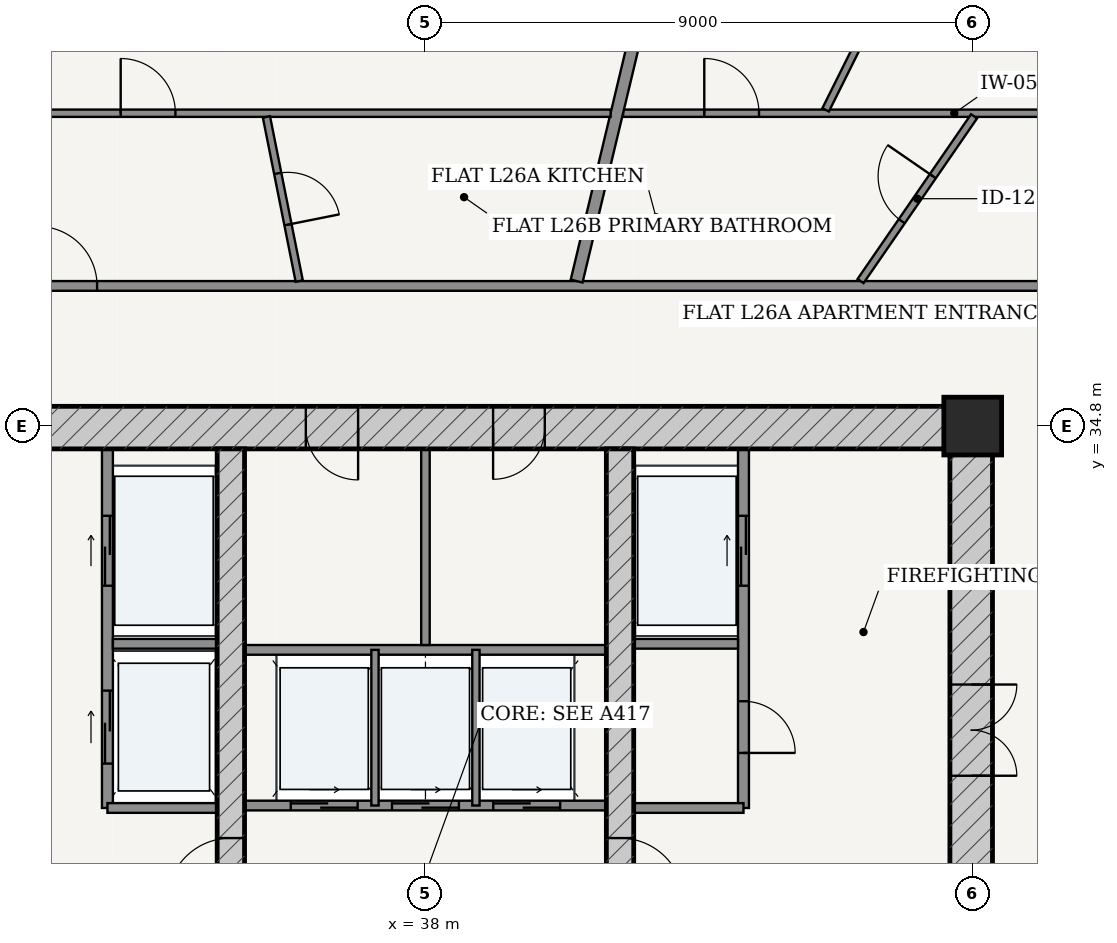
"""IFC4 building model, lengths in metres.
Left out: names, types, materials, properties, quantities, classifications, styles, units other than length and angle.
Written with IfcOpenShell. Run it as: python <this file> out.ifc"""

import sys

from ifc_helpers import new_model, si_unit, direction, frame, frame_2d, origin, origin_2d, place, context, subcontext, project, spatial, rectangle, extrude, source, transform, mapped, element, fill, save


model = new_model("IFC4")
c1 = context("Model", 3, precision=1e-05, world=origin(), true_north=direction((-0.2419218956, 0.970295726276)))
c2 = subcontext(c1, "Body", "Model", "MODEL_VIEW")
j1 = project(units=[si_unit("LENGTHUNIT", "METRE"), si_unit("PLANEANGLEUNIT", "RADIAN")], contexts=[c1])
p1 = place(None, origin())
s1 = spatial("IfcSite", under=j1, at=p1, CompositionType="ELEMENT")
p2 = place(p1, origin())
s2 = spatial("IfcBuilding", under=s1, at=p2, CompositionType="ELEMENT")
p3 = place(p2, frame((0.0, 0.0, 101.4)))
s3 = spatial("IfcBuildingStorey", under=s2, at=p3, CompositionType="ELEMENT", Elevation=101.4)
p4 = place(p3, frame((47.0, 34.8, 0.0), z_axis=(0.0, 0.0, 1.0), x_axis=(1.0, 0.0, 0.0)))
e1 = element("IfcColumn", 1, at=p4, inside=s3, PredefinedType="COLUMN", context=c2, shape_type="SweptSolid", body=[
    extrude(rectangle(XDim=0.95, YDim=0.95, at=origin_2d()), origin(), (0.0, 0.0, 1.0), 3.6),
])
p5 = place(p3, frame((28.675, 34.775, 0.0), z_axis=(0.0, 0.0, 1.0), x_axis=(1.0, 0.0, 0.0)))
e2 = element("IfcWall", 2, at=p5, inside=s3, PredefinedType="SHEAR", context=c2, shape_type="SweptSolid", body=[
    extrude(rectangle(XDim=18.65, YDim=0.7, at=frame_2d((9.325, 0.0))), origin(), (0.0, 0.0, 1.0), 3.325),
])
p6 = place(p5, frame((7.357, 0.0, 0.0)))
e3 = element("IfcOpeningElement", 3, at=p6, cuts=e2, PredefinedType="OPENING", context=c2, shape_type="SweptSolid", body=[
    extrude(rectangle(XDim=0.86, YDim=2.1, at=frame_2d((0.43, 1.05))), frame((0.0, 0.36, 0.0), z_axis=(0.0, -1.0, 0.0), x_axis=(1.0, 0.0, 0.0)), (0.0, 0.0, 1.0), 0.72),
])
p7 = place(p5, frame((10.438, 0.0, 0.0)))
e4 = element("IfcOpeningElement", 4, at=p7, cuts=e2, PredefinedType="OPENING", context=c2, shape_type="SweptSolid", body=[
    extrude(rectangle(XDim=0.85, YDim=2.1, at=frame_2d((0.425, 1.05))), frame((0.0, 0.36, 0.0), z_axis=(0.0, -1.0, 0.0), x_axis=(1.0, 0.0, 0.0)), (0.0, 0.0, 1.0), 0.72),
])
p8 = place(p3, frame((46.975, 19.175, 0.0), z_axis=(0.0, 0.0, 1.0), x_axis=(0.0, 1.0, 0.0)))
e5 = element("IfcWall", 5, at=p8, inside=s3, PredefinedType="SHEAR", context=c2, shape_type="SweptSolid", body=[
    extrude(rectangle(XDim=15.25, YDim=0.7, at=frame_2d((7.625, 0.0))), origin(), (0.0, 0.0, 1.0), 3.325),
])
p9 = place(p8, frame((9.875, 0.0, 0.0)))
e6 = element("IfcOpeningElement", 6, at=p9, cuts=e5, PredefinedType="OPENING", context=c2, shape_type="SweptSolid", body=[
    extrude(rectangle(XDim=1.5, YDim=2.2, at=frame_2d((0.75, 1.1))), frame((0.0, 0.36, 0.0), z_axis=(0.0, -1.0, 0.0), x_axis=(1.0, 0.0, 0.0)), (0.0, 0.0, 1.0), 0.72),
])
p10 = place(p3, frame((34.8, 19.175, 0.0), z_axis=(0.0, 0.0, 1.0), x_axis=(0.0, 1.0, 0.0)))
e7 = element("IfcWall", 7, at=p10, inside=s3, PredefinedType="SHEAR", context=c2, shape_type="SweptSolid", body=[
    extrude(rectangle(XDim=15.25, YDim=0.45, at=frame_2d((7.625, 0.0))), origin(), (0.0, 0.0, 1.0), 3.325),
])
p11 = place(p10, frame((7.8, 0.0, 0.0)))
e8 = element("IfcOpeningElement", 8, at=p11, cuts=e7, PredefinedType="OPENING", context=c2, shape_type="SweptSolid", body=[
    extrude(rectangle(XDim=1.05, YDim=2.15, at=frame_2d((0.525, 1.075))), frame((0.0, 0.235, 0.0), z_axis=(0.0, -1.0, 0.0), x_axis=(1.0, 0.0, 0.0)), (0.0, 0.0, 1.0), 0.47),
])
p12 = place(p3, frame((41.2, 19.175, 0.0), z_axis=(0.0, 0.0, 1.0), x_axis=(0.0, 1.0, 0.0)))
e9 = element("IfcWall", 9, at=p12, inside=s3, PredefinedType="SHEAR", context=c2, shape_type="SweptSolid", body=[
    extrude(rectangle(XDim=15.25, YDim=0.45, at=frame_2d((7.625, 0.0))), origin(), (0.0, 0.0, 1.0), 3.325),
])
p13 = place(p12, frame((7.8, 0.0, 0.0)))
e10 = element("IfcOpeningElement", 10, at=p13, cuts=e9, PredefinedType="OPENING", context=c2, shape_type="SweptSolid", body=[
    extrude(rectangle(XDim=1.05, YDim=2.15, at=frame_2d((0.525, 1.075))), frame((0.0, 0.235, 0.0), z_axis=(0.0, -1.0, 0.0), x_axis=(1.0, 0.0, 0.0)), (0.0, 0.0, 1.0), 0.47),
])
p14 = place(p3, frame((32.77, 28.52, 0.0), z_axis=(0.0, 0.0, 1.0), x_axis=(0.0, 1.0, 0.0)))
e11 = element("IfcWall", 11, at=p14, inside=s3, PredefinedType="PARTITIONING", context=c2, shape_type="SweptSolid", body=[
    extrude(rectangle(XDim=5.905, YDim=0.18, at=frame_2d((2.953, 0.0))), origin(), (0.0, 0.0, 1.0), 3.325),
])
p15 = place(p14, frame((3.655, 0.0, 0.0)))
e12 = element("IfcOpeningElement", 12, at=p15, cuts=e11, PredefinedType="OPENING", context=c2, shape_type="SweptSolid", body=[
    extrude(rectangle(XDim=1.15, YDim=2.2, at=frame_2d((0.575, 1.1))), frame((0.0, 0.1, 0.0), z_axis=(0.0, -1.0, 0.0), x_axis=(1.0, 0.0, 0.0)), (0.0, 0.0, 1.0), 0.2),
])
p16 = place(p14, frame((0.73, 0.0, 0.0)))
e13 = element("IfcOpeningElement", 13, at=p16, cuts=e11, PredefinedType="OPENING", context=c2, shape_type="SweptSolid", body=[
    extrude(rectangle(XDim=1.2, YDim=2.25, at=frame_2d((0.6, 1.125))), frame((0.0, 0.1, 0.0), z_axis=(0.0, -1.0, 0.0), x_axis=(1.0, 0.0, 0.0)), (0.0, 0.0, 1.0), 0.2),
])
p17 = place(p3, frame((32.86, 31.22, 0.0), z_axis=(0.0, 0.0, 1.0), x_axis=(1.0, 0.0, 0.0)))
e14 = element("IfcWall", 14, at=p17, inside=s3, PredefinedType="PARTITIONING", context=c2, shape_type="SweptSolid", body=[
    extrude(rectangle(XDim=1.715, YDim=0.16, at=frame_2d((0.857, 0.0))), origin(), (0.0, 0.0, 1.0), 3.325),
])
p18 = place(p3, frame((32.77, 28.52, 0.0), z_axis=(0.0, 0.0, 1.0), x_axis=(1.0, 0.0, 0.0)))
e15 = element("IfcWall", 15, at=p18, inside=s3, PredefinedType="PARTITIONING", context=c2, shape_type="SweptSolid", body=[
    extrude(rectangle(XDim=1.805, YDim=0.16, at=frame_2d((0.902, 0.0))), origin(), (0.0, 0.0, 1.0), 3.325),
])
p19 = place(p3, frame((43.23, 28.52, 0.0), z_axis=(0.0, 0.0, 1.0), x_axis=(0.0, 1.0, 0.0)))
e16 = element("IfcWall", 16, at=p19, inside=s3, PredefinedType="PARTITIONING", context=c2, shape_type="SweptSolid", body=[
    extrude(rectangle(XDim=5.905, YDim=0.18, at=frame_2d((2.953, 0.0))), origin(), (0.0, 0.0, 1.0), 3.325),
])
p20 = place(p19, frame((0.905, 0.0, 0.0)))
e17 = element("IfcOpeningElement", 17, at=p20, cuts=e16, PredefinedType="OPENING", context=c2, shape_type="SweptSolid", body=[
    extrude(rectangle(XDim=0.85, YDim=2.1, at=frame_2d((0.425, 1.05))), frame((0.0, 0.1, 0.0), z_axis=(0.0, -1.0, 0.0), x_axis=(1.0, 0.0, 0.0)), (0.0, 0.0, 1.0), 0.2),
])
p21 = place(p19, frame((3.655, 0.0, 0.0)))
e18 = element("IfcOpeningElement", 18, at=p21, cuts=e16, PredefinedType="OPENING", context=c2, shape_type="SweptSolid", body=[
    extrude(rectangle(XDim=1.15, YDim=2.2, at=frame_2d((0.575, 1.1))), frame((0.0, 0.1, 0.0), z_axis=(0.0, -1.0, 0.0), x_axis=(1.0, 0.0, 0.0)), (0.0, 0.0, 1.0), 0.2),
])
p22 = place(p3, frame((41.425, 31.22, 0.0), z_axis=(0.0, 0.0, 1.0), x_axis=(1.0, 0.0, 0.0)))
e19 = element("IfcWall", 19, at=p22, inside=s3, PredefinedType="PARTITIONING", context=c2, shape_type="SweptSolid", body=[
    extrude(rectangle(XDim=1.715, YDim=0.16, at=frame_2d((0.857, 0.0))), origin(), (0.0, 0.0, 1.0), 3.325),
])
p23 = place(p3, frame((41.425, 28.52, 0.0), z_axis=(0.0, 0.0, 1.0), x_axis=(1.0, 0.0, 0.0)))
e20 = element("IfcWall", 20, at=p23, inside=s3, PredefinedType="PARTITIONING", context=c2, shape_type="SweptSolid", body=[
    extrude(rectangle(XDim=1.805, YDim=0.16, at=frame_2d((0.902, 0.0))), origin(), (0.0, 0.0, 1.0), 3.325),
])
p24 = place(p3, frame((35.025, 28.56, 0.0), z_axis=(0.0, 0.0, 1.0), x_axis=(1.0, 0.0, 0.0)))
e21 = element("IfcWall", 21, at=p24, inside=s3, PredefinedType="PARTITIONING", context=c2, shape_type="SweptSolid", body=[
    extrude(rectangle(XDim=5.95, YDim=0.16, at=frame_2d((2.975, 0.0))), origin(), (0.0, 0.0, 1.0), 3.325),
])
p25 = place(p24, frame((0.76, 0.0, 0.0)))
e22 = element("IfcOpeningElement", 22, at=p25, cuts=e21, PredefinedType="OPENING", context=c2, shape_type="SweptSolid", body=[
    extrude(rectangle(XDim=1.1, YDim=2.2, at=frame_2d((0.55, 1.1))), frame((0.0, 0.09, 0.0), z_axis=(0.0, -1.0, 0.0), x_axis=(1.0, 0.0, 0.0)), (0.0, 0.0, 1.0), 0.18),
])
p26 = place(p24, frame((2.425, 0.0, 0.0)))
e23 = element("IfcOpeningElement", 23, at=p26, cuts=e21, PredefinedType="OPENING", context=c2, shape_type="SweptSolid", body=[
    extrude(rectangle(XDim=1.1, YDim=2.2, at=frame_2d((0.55, 1.1))), frame((0.0, 0.09, 0.0), z_axis=(0.0, -1.0, 0.0), x_axis=(1.0, 0.0, 0.0)), (0.0, 0.0, 1.0), 0.18),
])
p27 = place(p24, frame((4.09, 0.0, 0.0)))
e24 = element("IfcOpeningElement", 24, at=p27, cuts=e21, PredefinedType="OPENING", context=c2, shape_type="SweptSolid", body=[
    extrude(rectangle(XDim=1.1, YDim=2.2, at=frame_2d((0.55, 1.1))), frame((0.0, 0.09, 0.0), z_axis=(0.0, -1.0, 0.0), x_axis=(1.0, 0.0, 0.0)), (0.0, 0.0, 1.0), 0.18),
])
p28 = place(p3, frame((35.025, 31.12, 0.0), z_axis=(0.0, 0.0, 1.0), x_axis=(1.0, 0.0, 0.0)))
e25 = element("IfcWall", 25, at=p28, inside=s3, PredefinedType="PARTITIONING", context=c2, shape_type="SweptSolid", body=[
    extrude(rectangle(XDim=5.95, YDim=0.16, at=frame_2d((2.975, 0.0))), origin(), (0.0, 0.0, 1.0), 3.325),
])
for number, where, z_axis, x_axis in (
    (26, (37.17, 28.56, 0.0), (0.0, 0.0, 1.0), (0.0, 1.0, 0.0)),
    (27, (38.83, 28.56, 0.0), (0.0, 0.0, 1.0), (0.0, 1.0, 0.0)),
):
    element("IfcWall", number, at=place(p3, frame(where, z_axis=z_axis, x_axis=x_axis)), inside=s3, PredefinedType="PARTITIONING", context=c2, shape_type="SweptSolid", body=[
        extrude(rectangle(XDim=2.56, YDim=0.12, at=frame_2d((1.28, 0.0))), origin(), (0.0, 0.0, 1.0), 3.325),
    ])
p29 = place(p3, frame((38.0, 31.2, 0.0), z_axis=(0.0, 0.0, 1.0), x_axis=(0.0, 1.0, 0.0)))
e28 = element("IfcWall", 28, at=p29, inside=s3, PredefinedType="PARTITIONING", context=c2, shape_type="SweptSolid", body=[
    extrude(rectangle(XDim=3.225, YDim=0.14, at=frame_2d((1.613, 0.0))), origin(), (0.0, 0.0, 1.0), 3.325),
])
p30 = place(p3, frame((26.695, 37.105, 0.0), z_axis=(0.0, 0.0, 1.0), x_axis=(1.0, 0.0, 0.0)))
e29 = element("IfcWall", 29, at=p30, inside=s3, PredefinedType="PARTITIONING", context=c2, shape_type="SweptSolid", body=[
    extrude(rectangle(XDim=22.61, YDim=0.16, at=frame_2d((11.305, 0.0))), origin(), (0.0, 0.0, 1.0), 2.767),
])
p31 = place(p30, frame((4.925, 0.0, 0.0)))
e30 = element("IfcOpeningElement", 30, at=p31, cuts=e29, PredefinedType="OPENING", context=c2, shape_type="SweptSolid", body=[
    extrude(rectangle(XDim=0.98, YDim=2.2, at=frame_2d((0.49, 1.1))), frame((0.0, 0.09, 0.0), z_axis=(0.0, -1.0, 0.0), x_axis=(1.0, 0.0, 0.0)), (0.0, 0.0, 1.0), 0.18),
])
p32 = place(p3, frame((41.249, 39.945, 0.0), z_axis=(0.0, 0.0, 1.0), x_axis=(1.0, 0.0, 0.0)))
e31 = element("IfcWall", 31, at=p32, inside=s3, PredefinedType="PARTITIONING", context=c2, shape_type="SweptSolid", body=[
    extrude(rectangle(XDim=10.896, YDim=0.12, at=frame_2d((5.448, 0.0))), origin(), (0.0, 0.0, 1.0), 2.767),
])
p33 = place(p32, frame((1.336, 0.0, 0.0)))
e32 = element("IfcOpeningElement", 32, at=p33, cuts=e31, PredefinedType="OPENING", context=c2, shape_type="SweptSolid", body=[
    extrude(rectangle(XDim=0.9, YDim=2.15, at=frame_2d((0.45, 1.075))), frame((0.0, 0.07, 0.0), z_axis=(0.0, -1.0, 0.0), x_axis=(1.0, 0.0, 0.0)), (0.0, 0.0, 1.0), 0.14),
])
p34 = place(p3, frame((44.581, 40.0, 0.0), z_axis=(0.0, 0.0, 1.0), x_axis=(0.446188142997, 0.894939182877, 0.0)))
e33 = element("IfcWall", 33, at=p34, inside=s3, PredefinedType="PARTITIONING", context=c2, shape_type="SweptSolid", body=[
    extrude(rectangle(XDim=8.002, YDim=0.12, at=frame_2d((4.001, 0.0))), origin(), (0.0, 0.0, 1.0), 2.767),
])
p35 = place(p34, frame((3.551, 0.0, 0.0)))
e34 = element("IfcOpeningElement", 34, at=p35, cuts=e33, PredefinedType="OPENING", context=c2, shape_type="SweptSolid", body=[
    extrude(rectangle(XDim=0.9, YDim=2.15, at=frame_2d((0.45, 1.075))), frame((0.0, 0.07, 0.0), z_axis=(0.0, -1.0, 0.0), x_axis=(1.0, 0.0, 0.0)), (0.0, 0.0, 1.0), 0.14),
])
p36 = place(p3, frame((45.155, 37.185, 0.0), z_axis=(0.0, 0.0, 1.0), x_axis=(0.567360037454, 0.823469846382, 0.0)))
e35 = element("IfcWall", 35, at=p36, inside=s3, PredefinedType="PARTITIONING", context=c2, shape_type="SweptSolid", body=[
    extrude(rectangle(XDim=3.29, YDim=0.12, at=frame_2d((1.645, 0.0))), origin(), (0.0, 0.0, 1.0), 3.004),
])
p37 = place(p36, frame((1.195, 0.0, 0.0)))
e36 = element("IfcOpeningElement", 36, at=p37, cuts=e35, PredefinedType="OPENING", context=c2, shape_type="SweptSolid", body=[
    extrude(rectangle(XDim=0.9, YDim=2.15, at=frame_2d((0.45, 1.075))), frame((0.0, 0.07, 0.0), z_axis=(0.0, -1.0, 0.0), x_axis=(1.0, 0.0, 0.0)), (0.0, 0.0, 1.0), 0.14),
])
p38 = place(p3, frame((40.486, 37.185, 0.0), z_axis=(0.0, 0.0, 1.0), x_axis=(0.232834224261, 0.972516438942, 0.0)))
e37 = element("IfcWall", 37, at=p38, inside=s3, PredefinedType="PARTITIONING", context=c2, shape_type="SweptSolid", body=[
    extrude(rectangle(XDim=11.502, YDim=0.2, at=frame_2d((5.751, 0.0))), origin(), (0.0, 0.0, 1.0), 2.767),
])
p39 = place(p3, frame((23.855, 39.945, 0.0), z_axis=(0.0, 0.0, 1.0), x_axis=(1.0, 0.0, 0.0)))
e38 = element("IfcWall", 38, at=p39, inside=s3, PredefinedType="PARTITIONING", context=c2, shape_type="SweptSolid", body=[
    extrude(rectangle(XDim=17.19, YDim=0.12, at=frame_2d((8.595, 0.0))), origin(), (0.0, 0.0, 1.0), 2.767),
])
p40 = place(p39, frame((9.133, 0.0, 0.0)))
e39 = element("IfcOpeningElement", 39, at=p40, cuts=e38, PredefinedType="OPENING", context=c2, shape_type="SweptSolid", body=[
    extrude(rectangle(XDim=0.9, YDim=2.15, at=frame_2d((0.45, 1.075))), frame((0.0, 0.07, 0.0), z_axis=(0.0, -1.0, 0.0), x_axis=(1.0, 0.0, 0.0)), (0.0, 0.0, 1.0), 0.14),
])
p41 = place(p3, frame((35.925, 37.185, 0.0), z_axis=(0.0, 0.0, 1.0), x_axis=(-0.196013794811, 0.980601138202, 0.0)))
e40 = element("IfcWall", 40, at=p41, inside=s3, PredefinedType="PARTITIONING", context=c2, shape_type="SweptSolid", body=[
    extrude(rectangle(XDim=2.753, YDim=0.12, at=frame_2d((1.376, 0.0))), origin(), (0.0, 0.0, 1.0), 3.325),
])
p42 = place(p41, frame((0.946, 0.0, 0.0)))
e41 = element("IfcOpeningElement", 41, at=p42, cuts=e40, PredefinedType="OPENING", context=c2, shape_type="SweptSolid", body=[
    extrude(rectangle(XDim=0.86, YDim=2.15, at=frame_2d((0.43, 1.075))), frame((0.0, 0.07, 0.0), z_axis=(0.0, -1.0, 0.0), x_axis=(1.0, 0.0, 0.0)), (0.0, 0.0, 1.0), 0.14),
])
m1 = source(origin(), c2, "Body", "SweptSolid", [
    extrude(rectangle(XDim=1.5, YDim=2.2, at=frame_2d((0.75, 1.1))), frame((0.0, 0.025, 0.0), z_axis=(0.0, -1.0, 0.0), x_axis=(1.0, 0.0, 0.0)), (0.0, 0.0, 1.0), 0.05),
])
p43 = place(p9, frame((1.5, 0.0, 0.0), z_axis=(0.0, 0.0, 1.0), x_axis=(-1.0, 0.0, 0.0)))
e42 = element("IfcDoor", 42, at=p43, inside=s3, OperationType="DOUBLE_DOOR_SINGLE_SWING", PredefinedType="DOOR", context=c2, shape_type="MappedRepresentation", body=[
    mapped(m1, transform((0.0, 0.0, 0.0), scale=1.0)),
])
fill(e6, e42)
m2 = source(origin(), c2, "Body", "SweptSolid", [
    extrude(rectangle(XDim=1.05, YDim=2.15, at=frame_2d((0.525, 1.075))), frame((0.0, 0.025, 0.0), z_axis=(0.0, -1.0, 0.0), x_axis=(1.0, 0.0, 0.0)), (0.0, 0.0, 1.0), 0.05),
])
p44 = place(p11, origin())
e43 = element("IfcDoor", 43, at=p44, inside=s3, OperationType="SINGLE_SWING_LEFT", PredefinedType="DOOR", context=c2, shape_type="MappedRepresentation", body=[
    mapped(m2, transform((0.0, 0.0, 0.0), scale=1.0)),
])
fill(e8, e43)
p45 = place(p13, frame((1.05, 0.0, 0.0), z_axis=(0.0, 0.0, 1.0), x_axis=(-1.0, 0.0, 0.0)))
e44 = element("IfcDoor", 44, at=p45, inside=s3, OperationType="SINGLE_SWING_RIGHT", PredefinedType="DOOR", context=c2, shape_type="MappedRepresentation", body=[
    mapped(m2, transform((0.0, 0.0, 0.0), scale=1.0)),
])
fill(e10, e44)
m3 = source(origin(), c2, "Body", "SweptSolid", [
    extrude(rectangle(XDim=0.85, YDim=2.1, at=frame_2d((0.425, 1.05))), frame((0.0, 0.025, 0.0), z_axis=(0.0, -1.0, 0.0), x_axis=(1.0, 0.0, 0.0)), (0.0, 0.0, 1.0), 0.05),
])
p46 = place(p20, frame((0.85, 0.0, 0.0), z_axis=(0.0, 0.0, 1.0), x_axis=(-1.0, 0.0, 0.0)))
e45 = element("IfcDoor", 45, at=p46, inside=s3, OperationType="SINGLE_SWING_RIGHT", PredefinedType="DOOR", context=c2, shape_type="MappedRepresentation", body=[
    mapped(m3, transform((0.0, 0.0, 0.0), scale=1.0)),
])
fill(e17, e45)
m4 = source(origin(), c2, "Body", "SweptSolid", [
    extrude(rectangle(XDim=0.86, YDim=2.1, at=frame_2d((0.43, 1.05))), frame((0.0, 0.025, 0.0), z_axis=(0.0, -1.0, 0.0), x_axis=(1.0, 0.0, 0.0)), (0.0, 0.0, 1.0), 0.05),
])
p47 = place(p6, frame((0.86, 0.0, 0.0), z_axis=(0.0, 0.0, 1.0), x_axis=(-1.0, 0.0, 0.0)))
e46 = element("IfcDoor", 46, at=p47, inside=s3, OperationType="SINGLE_SWING_LEFT", PredefinedType="DOOR", context=c2, shape_type="MappedRepresentation", body=[
    mapped(m4, transform((0.0, 0.0, 0.0), scale=1.0)),
])
fill(e3, e46)
p48 = place(p7, frame((0.85, 0.0, 0.0), z_axis=(0.0, 0.0, 1.0), x_axis=(-1.0, 0.0, 0.0)))
e47 = element("IfcDoor", 47, at=p48, inside=s3, OperationType="SINGLE_SWING_RIGHT", PredefinedType="DOOR", context=c2, shape_type="MappedRepresentation", body=[
    mapped(m3, transform((0.0, 0.0, 0.0), scale=1.0)),
])
fill(e4, e47)
m5 = source(origin(), c2, "Body", "SweptSolid", [
    extrude(rectangle(XDim=1.15, YDim=2.2, at=frame_2d((0.575, 1.1))), frame((0.0, 0.025, 0.0), z_axis=(0.0, -1.0, 0.0), x_axis=(1.0, 0.0, 0.0)), (0.0, 0.0, 1.0), 0.05),
])
p49 = place(p15, origin())
e48 = element("IfcDoor", 48, at=p49, inside=s3, OperationType="DOUBLE_DOOR_SLIDING", PredefinedType="DOOR", context=c2, shape_type="MappedRepresentation", body=[
    mapped(m5, transform((0.0, 0.0, 0.0), scale=1.0)),
])
fill(e12, e48)
p50 = place(p21, origin())
e49 = element("IfcDoor", 49, at=p50, inside=s3, OperationType="DOUBLE_DOOR_SLIDING", PredefinedType="DOOR", context=c2, shape_type="MappedRepresentation", body=[
    mapped(m5, transform((0.0, 0.0, 0.0), scale=1.0)),
])
fill(e18, e49)
m6 = source(origin(), c2, "Body", "SweptSolid", [
    extrude(rectangle(XDim=1.2, YDim=2.25, at=frame_2d((0.6, 1.125))), frame((0.0, 0.025, 0.0), z_axis=(0.0, -1.0, 0.0), x_axis=(1.0, 0.0, 0.0)), (0.0, 0.0, 1.0), 0.05),
])
p51 = place(p16, origin())
e50 = element("IfcDoor", 50, at=p51, inside=s3, OperationType="DOUBLE_DOOR_SLIDING", PredefinedType="DOOR", context=c2, shape_type="MappedRepresentation", body=[
    mapped(m6, transform((0.0, 0.0, 0.0), scale=1.0)),
])
fill(e13, e50)
m7 = source(origin(), c2, "Body", "SweptSolid", [
    extrude(rectangle(XDim=1.1, YDim=2.2, at=frame_2d((0.55, 1.1))), frame((0.0, 0.025, 0.0), z_axis=(0.0, -1.0, 0.0), x_axis=(1.0, 0.0, 0.0)), (0.0, 0.0, 1.0), 0.05),
])
p52 = place(p25, origin())
e51 = element("IfcDoor", 51, at=p52, inside=s3, OperationType="DOUBLE_DOOR_SLIDING", PredefinedType="DOOR", context=c2, shape_type="MappedRepresentation", body=[
    mapped(m7, transform((0.0, 0.0, 0.0), scale=1.0)),
])
fill(e22, e51)
p53 = place(p26, origin())
e52 = element("IfcDoor", 52, at=p53, inside=s3, OperationType="DOUBLE_DOOR_SLIDING", PredefinedType="DOOR", context=c2, shape_type="MappedRepresentation", body=[
    mapped(m7, transform((0.0, 0.0, 0.0), scale=1.0)),
])
fill(e23, e52)
p54 = place(p27, origin())
e53 = element("IfcDoor", 53, at=p54, inside=s3, OperationType="DOUBLE_DOOR_SLIDING", PredefinedType="DOOR", context=c2, shape_type="MappedRepresentation", body=[
    mapped(m7, transform((0.0, 0.0, 0.0), scale=1.0)),
])
fill(e24, e53)
m8 = source(origin(), c2, "Body", "SweptSolid", [
    extrude(rectangle(XDim=0.9, YDim=2.15, at=frame_2d((0.45, 1.075))), frame((0.0, 0.025, 0.0), z_axis=(0.0, -1.0, 0.0), x_axis=(1.0, 0.0, 0.0)), (0.0, 0.0, 1.0), 0.05),
])
p55 = place(p37, origin())
e54 = element("IfcDoor", 54, at=p55, inside=s3, OperationType="SINGLE_SWING_RIGHT", PredefinedType="DOOR", context=c2, shape_type="MappedRepresentation", body=[
    mapped(m8, transform((0.0, 0.0, 0.0), scale=1.0)),
])
fill(e36, e54)
p56 = place(p33, origin())
e55 = element("IfcDoor", 55, at=p56, inside=s3, OperationType="SINGLE_SWING_LEFT", PredefinedType="DOOR", context=c2, shape_type="MappedRepresentation", body=[
    mapped(m8, transform((0.0, 0.0, 0.0), scale=1.0)),
])
fill(e32, e55)
m9 = source(origin(), c2, "Body", "SweptSolid", [
    extrude(rectangle(XDim=0.98, YDim=2.2, at=frame_2d((0.49, 1.1))), frame((0.0, 0.025, 0.0), z_axis=(0.0, -1.0, 0.0), x_axis=(1.0, 0.0, 0.0)), (0.0, 0.0, 1.0), 0.05),
])
p57 = place(p31, origin())
e56 = element("IfcDoor", 56, at=p57, inside=s3, OperationType="SINGLE_SWING_LEFT", PredefinedType="DOOR", context=c2, shape_type="MappedRepresentation", body=[
    mapped(m9, transform((0.0, 0.0, 0.0), scale=1.0)),
])
fill(e30, e56)
m10 = source(origin(), c2, "Body", "SweptSolid", [
    extrude(rectangle(XDim=0.86, YDim=2.15, at=frame_2d((0.43, 1.075))), frame((0.0, 0.025, 0.0), z_axis=(0.0, -1.0, 0.0), x_axis=(1.0, 0.0, 0.0)), (0.0, 0.0, 1.0), 0.05),
])
p58 = place(p42, frame((0.86, 0.0, 0.0), z_axis=(0.0, 0.0, 1.0), x_axis=(-1.0, 0.0, 0.0)))
e57 = element("IfcDoor", 57, at=p58, inside=s3, OperationType="SINGLE_SWING_RIGHT", PredefinedType="DOOR", context=c2, shape_type="MappedRepresentation", body=[
    mapped(m10, transform((0.0, 0.0, 0.0), scale=1.0)),
])
fill(e41, e57)
p59 = place(p40, origin())
e58 = element("IfcDoor", 58, at=p59, inside=s3, OperationType="SINGLE_SWING_LEFT", PredefinedType="DOOR", context=c2, shape_type="MappedRepresentation", body=[
    mapped(m8, transform((0.0, 0.0, 0.0), scale=1.0)),
])
fill(e39, e58)
save(model, sys.argv[1])
